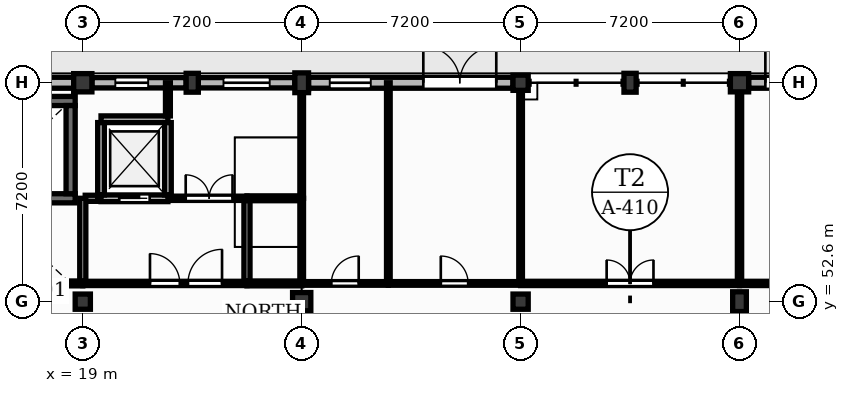
"""IFC4 building model, lengths in metres.
Left out: names, types, materials, properties, quantities, classifications, styles, units other than length and angle.
Written with IfcOpenShell. Run it as: python <this file> out.ifc"""

import sys

from ifc_helpers import new_model, si_unit, direction, frame, frame_2d, origin, origin_2d, place, context, subcontext, project, spatial, rectangle, extrude, element, fill, save


model = new_model("IFC4")
c1 = context("Model", 3, precision=1e-05, world=origin(), true_north=direction((0.0, 1.0)))
c2 = subcontext(c1, "Body", "Model", "MODEL_VIEW")
j1 = project(units=[si_unit("LENGTHUNIT", "METRE"), si_unit("PLANEANGLEUNIT", "RADIAN")], contexts=[c1])
p1 = place(None, origin())
s1 = spatial("IfcSite", under=j1, at=p1, CompositionType="ELEMENT")
p2 = place(p1, origin())
s2 = spatial("IfcBuilding", under=s1, at=p2, CompositionType="ELEMENT")
p3 = place(p2, origin())
s3 = spatial("IfcBuildingStorey", under=s2, at=p3, CompositionType="ELEMENT", Elevation=0.0)
p4 = place(p3, frame((19.0, 52.6, 0.0), z_axis=(0.0, 0.0, 1.0), x_axis=(1.0, 0.0, 0.0)))
e1 = element("IfcColumn", 1, at=p4, inside=s3, PredefinedType="COLUMN", context=c2, shape_type="SweptSolid", body=[
    extrude(rectangle(XDim=0.5, YDim=0.5, at=origin_2d()), origin(), (0.0, 0.0, 1.0), 4.2),
])
for number, where, z_axis, x_axis in (
    (2, (19.0, 59.8, 0.0), (0.0, 0.0, 1.0), (1.0, 0.0, 0.0)),
    (3, (26.2, 52.6, 0.0), (0.0, 0.0, 1.0), (1.0, 0.0, 0.0)),
):
    element("IfcColumn", number, at=place(p3, frame(where, z_axis=z_axis, x_axis=x_axis)), inside=s3, PredefinedType="COLUMN", context=c2, shape_type="SweptSolid", body=[
        extrude(rectangle(XDim=0.6, YDim=0.6, at=origin_2d()), origin(), (0.0, 0.0, 1.0), 4.2),
    ])
p5 = place(p3, frame((26.2, 59.8, 0.0), z_axis=(0.0, 0.0, 1.0), x_axis=(1.0, 0.0, 0.0)))
e4 = element("IfcColumn", 4, at=p5, inside=s3, PredefinedType="COLUMN", context=c2, shape_type="SweptSolid", body=[
    extrude(rectangle(XDim=0.45, YDim=0.65, at=origin_2d()), origin(), (0.0, 0.0, 1.0), 4.2),
])
for number, where, z_axis, x_axis in (
    (5, (33.4, 52.6, 0.0), (0.0, 0.0, 1.0), (1.0, 0.0, 0.0)),
    (6, (33.4, 59.8, 0.0), (0.0, 0.0, 1.0), (1.0, 0.0, 0.0)),
):
    element("IfcColumn", number, at=place(p3, frame(where, z_axis=z_axis, x_axis=x_axis)), inside=s3, PredefinedType="COLUMN", context=c2, shape_type="SweptSolid", body=[
        extrude(rectangle(XDim=0.5, YDim=0.5, at=origin_2d()), origin(), (0.0, 0.0, 1.0), 4.2),
    ])
p6 = place(p3, frame((40.6, 52.6, 0.0), z_axis=(0.0, 0.0, 1.0), x_axis=(1.0, 0.0, 0.0)))
e7 = element("IfcColumn", 7, at=p6, inside=s3, PredefinedType="COLUMN", context=c2, shape_type="SweptSolid", body=[
    extrude(rectangle(XDim=0.45, YDim=0.65, at=origin_2d()), origin(), (0.0, 0.0, 1.0), 4.2),
])
p7 = place(p3, frame((40.6, 59.8, 0.0), z_axis=(0.0, 0.0, 1.0), x_axis=(1.0, 0.0, 0.0)))
e8 = element("IfcColumn", 8, at=p7, inside=s3, PredefinedType="COLUMN", context=c2, shape_type="SweptSolid", body=[
    extrude(rectangle(XDim=0.6, YDim=0.6, at=origin_2d()), origin(), (0.0, 0.0, 1.0), 4.2),
])
for number, where, z_axis, x_axis in (
    (9, (22.6, 59.8, 0.0), (0.0, 0.0, 1.0), (1.0, 0.0, 0.0)),
    (10, (37.0, 59.8, 0.0), (0.0, 0.0, 1.0), (1.0, 0.0, 0.0)),
):
    element("IfcColumn", number, at=place(p3, frame(where, z_axis=z_axis, x_axis=x_axis)), inside=s3, PredefinedType="PILASTER", context=c2, shape_type="SweptSolid", body=[
        extrude(rectangle(XDim=0.4, YDim=0.62, at=origin_2d()), origin(), (0.0, 0.0, 1.0), 4.2),
    ])
p8 = place(p3, frame((12.025, 59.8, 0.0), z_axis=(0.0, 0.0, 1.0), x_axis=(1.0, 0.0, 0.0)))
e11 = element("IfcWall", 11, at=p8, inside=s3, PredefinedType="SOLIDWALL", context=c2, shape_type="SweptSolid", body=[
    extrude(rectangle(XDim=6.675, YDim=0.36, at=frame_2d((3.337, 0.0))), origin(), (0.0, 0.0, 1.0), 3.68),
])
p9 = place(p3, frame((19.3, 59.8, 0.0), z_axis=(0.0, 0.0, 1.0), x_axis=(1.0, 0.0, 0.0)))
e12 = element("IfcWall", 12, at=p9, inside=s3, PredefinedType="SOLIDWALL", context=c2, shape_type="SweptSolid", body=[
    extrude(rectangle(XDim=3.1, YDim=0.34, at=frame_2d((1.55, 0.0))), origin(), (0.0, 0.0, 1.0), 3.68),
])
p10 = place(p9, frame((0.77, 0.0, 1.0)))
e13 = element("IfcOpeningElement", 13, at=p10, cuts=e12, PredefinedType="OPENING", context=c2, shape_type="SweptSolid", body=[
    extrude(rectangle(XDim=1.08, YDim=1.95, at=frame_2d((0.54, 0.975))), frame((0.0, 0.18, 0.0), z_axis=(0.0, -1.0, 0.0), x_axis=(1.0, 0.0, 0.0)), (0.0, 0.0, 1.0), 0.36),
])
p11 = place(p3, frame((22.8, 59.8, 0.0), z_axis=(0.0, 0.0, 1.0), x_axis=(1.0, 0.0, 0.0)))
e14 = element("IfcWall", 14, at=p11, inside=s3, PredefinedType="SOLIDWALL", context=c2, shape_type="SweptSolid", body=[
    extrude(rectangle(XDim=3.175, YDim=0.34, at=frame_2d((1.587, 0.0))), origin(), (0.0, 0.0, 1.0), 3.68),
])
p12 = place(p11, frame((0.827, 0.0, 1.0)))
e15 = element("IfcOpeningElement", 15, at=p12, cuts=e14, PredefinedType="OPENING", context=c2, shape_type="SweptSolid", body=[
    extrude(rectangle(XDim=1.52, YDim=1.8, at=frame_2d((0.76, 0.9))), frame((0.0, 0.18, 0.0), z_axis=(0.0, -1.0, 0.0), x_axis=(1.0, 0.0, 0.0)), (0.0, 0.0, 1.0), 0.36),
])
p13 = place(p3, frame((26.425, 59.8, 0.0), z_axis=(0.0, 0.0, 1.0), x_axis=(1.0, 0.0, 0.0)))
e16 = element("IfcWall", 16, at=p13, inside=s3, PredefinedType="SOLIDWALL", context=c2, shape_type="SweptSolid", body=[
    extrude(rectangle(XDim=6.725, YDim=0.36, at=frame_2d((3.362, 0.0))), origin(), (0.0, 0.0, 1.0), 3.68),
])
p14 = place(p13, frame((3.775, 0.0, 0.0)))
e17 = element("IfcOpeningElement", 17, at=p14, cuts=e16, PredefinedType="OPENING", context=c2, shape_type="SweptSolid", body=[
    extrude(rectangle(XDim=2.4, YDim=2.8, at=frame_2d((1.2, 1.4))), frame((0.0, 0.19, 0.0), z_axis=(0.0, -1.0, 0.0), x_axis=(1.0, 0.0, 0.0)), (0.0, 0.0, 1.0), 0.38),
])
p15 = place(p13, frame((0.698, 0.0, 1.0)))
e18 = element("IfcOpeningElement", 18, at=p15, cuts=e16, PredefinedType="OPENING", context=c2, shape_type="SweptSolid", body=[
    extrude(rectangle(XDim=1.35, YDim=2.2, at=frame_2d((0.675, 1.1))), frame((0.0, 0.19, 0.0), z_axis=(0.0, -1.0, 0.0), x_axis=(1.0, 0.0, 0.0)), (0.0, 0.0, 1.0), 0.38),
])
p16 = place(p3, frame((40.9, 59.8, 0.0), z_axis=(0.0, 0.0, 1.0), x_axis=(1.0, 0.0, 0.0)))
e19 = element("IfcWall", 19, at=p16, inside=s3, PredefinedType="SOLIDWALL", context=c2, shape_type="SweptSolid", body=[
    extrude(rectangle(XDim=6.65, YDim=0.36, at=frame_2d((3.325, 0.0))), origin(), (0.0, 0.0, 1.0), 3.68),
])
p17 = place(p16, frame((0.55, 0.0, 0.0)))
e20 = element("IfcOpeningElement", 20, at=p17, cuts=e19, PredefinedType="OPENING", context=c2, shape_type="SweptSolid", body=[
    extrude(rectangle(XDim=1.22, YDim=2.2, at=frame_2d((0.61, 1.1))), frame((0.0, 0.19, 0.0), z_axis=(0.0, -1.0, 0.0), x_axis=(1.0, 0.0, 0.0)), (0.0, 0.0, 1.0), 0.38),
])
p18 = place(p16, frame((4.49, 0.0, 0.0)))
e21 = element("IfcOpeningElement", 21, at=p18, cuts=e19, PredefinedType="OPENING", context=c2, shape_type="SweptSolid", body=[
    extrude(rectangle(XDim=1.22, YDim=2.2, at=frame_2d((0.61, 1.1))), frame((0.0, 0.19, 0.0), z_axis=(0.0, -1.0, 0.0), x_axis=(1.0, 0.0, 0.0)), (0.0, 0.0, 1.0), 0.38),
])
for number, where, z_axis, x_axis in (
    (22, (12.05, 56.0, 0.0), (0.0, 0.0, 1.0), (1.0, 0.0, 0.0)),
    (23, (12.05, 59.2, 0.0), (0.0, 0.0, 1.0), (1.0, 0.0, 0.0)),
):
    element("IfcWall", number, at=place(p3, frame(where, z_axis=z_axis, x_axis=x_axis)), inside=s3, PredefinedType="SHEAR", context=c2, shape_type="SweptSolid", body=[
        extrude(rectangle(XDim=6.7, YDim=0.3, at=frame_2d((3.35, 0.0))), origin(), (0.0, 0.0, 1.0), 4.25),
    ])
p19 = place(p3, frame((18.6, 56.15, 0.0), z_axis=(0.0, 0.0, 1.0), x_axis=(0.0, 1.0, 0.0)))
e24 = element("IfcWall", 24, at=p19, inside=s3, PredefinedType="SHEAR", context=c2, shape_type="SweptSolid", body=[
    extrude(rectangle(XDim=2.9, YDim=0.3, at=frame_2d((1.45, 0.0))), origin(), (0.0, 0.0, 1.0), 4.25),
])
p20 = place(p3, frame((19.6, 56.0, 0.0), z_axis=(0.0, 0.0, 1.0), x_axis=(1.0, 0.0, 0.0)))
e25 = element("IfcWall", 25, at=p20, inside=s3, PredefinedType="SOLIDWALL", context=c2, shape_type="SweptSolid", body=[
    extrude(rectangle(XDim=2.2, YDim=0.22, at=frame_2d((1.1, 0.0))), origin(), (0.0, 0.0, 1.0), 4.25),
])
p21 = place(p20, frame((0.6, 0.0, 0.0)))
e26 = element("IfcOpeningElement", 26, at=p21, cuts=e25, PredefinedType="OPENING", context=c2, shape_type="SweptSolid", body=[
    extrude(rectangle(XDim=1.0, YDim=2.15, at=frame_2d((0.5, 1.075))), frame((0.0, 0.12, 0.0), z_axis=(0.0, -1.0, 0.0), x_axis=(1.0, 0.0, 0.0)), (0.0, 0.0, 1.0), 0.24),
])
p22 = place(p3, frame((19.6, 58.6, 0.0), z_axis=(0.0, 0.0, 1.0), x_axis=(1.0, 0.0, 0.0)))
e27 = element("IfcWall", 27, at=p22, inside=s3, PredefinedType="SOLIDWALL", context=c2, shape_type="SweptSolid", body=[
    extrude(rectangle(XDim=2.2, YDim=0.22, at=frame_2d((1.1, 0.0))), origin(), (0.0, 0.0, 1.0), 4.25),
])
for number, where, z_axis, x_axis in (
    (28, (19.6, 56.11, 0.0), (0.0, 0.0, 1.0), (0.0, 1.0, 0.0)),
    (29, (21.8, 56.11, 0.0), (0.0, 0.0, 1.0), (0.0, 1.0, 0.0)),
):
    element("IfcWall", number, at=place(p3, frame(where, z_axis=z_axis, x_axis=x_axis)), inside=s3, PredefinedType="SOLIDWALL", context=c2, shape_type="SweptSolid", body=[
        extrude(rectangle(XDim=2.38, YDim=0.22, at=frame_2d((1.19, 0.0))), origin(), (0.0, 0.0, 1.0), 4.25),
    ])
p23 = place(p3, frame((19.0, 53.2, 0.0), z_axis=(0.0, 0.0, 1.0), x_axis=(1.0, 0.0, 0.0)))
e30 = element("IfcWall", 30, at=p23, inside=s3, PredefinedType="PARTITIONING", context=c2, shape_type="SweptSolid", body=[
    extrude(rectangle(XDim=5.4, YDim=0.14, at=frame_2d((2.7, 0.0))), origin(), (0.0, 0.0, 1.0), 4.18),
])
p24 = place(p23, frame((2.21, 0.0, 0.0)))
e31 = element("IfcOpeningElement", 31, at=p24, cuts=e30, PredefinedType="OPENING", context=c2, shape_type="SweptSolid", body=[
    extrude(rectangle(XDim=0.98, YDim=2.15, at=frame_2d((0.49, 1.075))), frame((0.0, 0.08, 0.0), z_axis=(0.0, -1.0, 0.0), x_axis=(1.0, 0.0, 0.0)), (0.0, 0.0, 1.0), 0.16),
])
p25 = place(p23, frame((3.46, 0.0, 0.0)))
e32 = element("IfcOpeningElement", 32, at=p25, cuts=e30, PredefinedType="OPENING", context=c2, shape_type="SweptSolid", body=[
    extrude(rectangle(XDim=1.12, YDim=2.15, at=frame_2d((0.56, 1.075))), frame((0.0, 0.08, 0.0), z_axis=(0.0, -1.0, 0.0), x_axis=(1.0, 0.0, 0.0)), (0.0, 0.0, 1.0), 0.16),
])
p26 = place(p3, frame((21.91, 56.0, 0.0), z_axis=(0.0, 0.0, 1.0), x_axis=(1.0, 0.0, 0.0)))
e33 = element("IfcWall", 33, at=p26, inside=s3, PredefinedType="PARTITIONING", context=c2, shape_type="SweptSolid", body=[
    extrude(rectangle(XDim=2.49, YDim=0.14, at=frame_2d((1.245, 0.0))), origin(), (0.0, 0.0, 1.0), 4.18),
])
p27 = place(p26, frame((0.475, 0.0, 0.0)))
e34 = element("IfcOpeningElement", 34, at=p27, cuts=e33, PredefinedType="OPENING", context=c2, shape_type="SweptSolid", body=[
    extrude(rectangle(XDim=1.54, YDim=2.25, at=frame_2d((0.77, 1.125))), frame((0.0, 0.08, 0.0), z_axis=(0.0, -1.0, 0.0), x_axis=(1.0, 0.0, 0.0)), (0.0, 0.0, 1.0), 0.16),
])
p28 = place(p3, frame((26.2, 53.2, 0.0), z_axis=(0.0, 0.0, 1.0), x_axis=(1.0, 0.0, 0.0)))
e35 = element("IfcWall", 35, at=p28, inside=s3, PredefinedType="PLUMBINGWALL", context=c2, shape_type="SweptSolid", body=[
    extrude(rectangle(XDim=2.85, YDim=0.12, at=frame_2d((1.425, 0.0))), origin(), (0.0, 0.0, 1.0), 4.18),
])
p29 = place(p28, frame((0.975, 0.0, 0.0)))
e36 = element("IfcOpeningElement", 36, at=p29, cuts=e35, PredefinedType="OPENING", context=c2, shape_type="SweptSolid", body=[
    extrude(rectangle(XDim=0.9, YDim=2.1, at=frame_2d((0.45, 1.05))), frame((0.0, 0.07, 0.0), z_axis=(0.0, -1.0, 0.0), x_axis=(1.0, 0.0, 0.0)), (0.0, 0.0, 1.0), 0.14),
])
p30 = place(p3, frame((26.2, 56.0, 0.0), z_axis=(0.0, 0.0, 1.0), x_axis=(0.0, 1.0, 0.0)))
e37 = element("IfcWall", 37, at=p30, inside=s3, PredefinedType="PLUMBINGWALL", context=c2, shape_type="SweptSolid", body=[
    extrude(rectangle(XDim=3.475, YDim=0.12, at=frame_2d((1.738, 0.0))), origin(), (0.0, 0.0, 1.0), 3.5),
])
p31 = place(p3, frame((29.05, 53.27, 0.0), z_axis=(0.0, 0.0, 1.0), x_axis=(0.0, 1.0, 0.0)))
e38 = element("IfcWall", 38, at=p31, inside=s3, PredefinedType="PLUMBINGWALL", context=c2, shape_type="SweptSolid", body=[
    extrude(rectangle(XDim=6.53, YDim=0.12, at=frame_2d((3.265, 0.0))), origin(), (0.0, 0.0, 1.0), 4.18),
])
p32 = place(p3, frame((29.05, 53.2, 0.0), z_axis=(0.0, 0.0, 1.0), x_axis=(1.0, 0.0, 0.0)))
e39 = element("IfcWall", 39, at=p32, inside=s3, PredefinedType="PLUMBINGWALL", context=c2, shape_type="SweptSolid", body=[
    extrude(rectangle(XDim=4.35, YDim=0.12, at=frame_2d((2.175, 0.0))), origin(), (0.0, 0.0, 1.0), 4.18),
])
p33 = place(p32, frame((1.725, 0.0, 0.0)))
e40 = element("IfcOpeningElement", 40, at=p33, cuts=e39, PredefinedType="OPENING", context=c2, shape_type="SweptSolid", body=[
    extrude(rectangle(XDim=0.9, YDim=2.1, at=frame_2d((0.45, 1.05))), frame((0.0, 0.07, 0.0), z_axis=(0.0, -1.0, 0.0), x_axis=(1.0, 0.0, 0.0)), (0.0, 0.0, 1.0), 0.14),
])
p34 = place(p3, frame((33.4, 53.27, 0.0), z_axis=(0.0, 0.0, 1.0), x_axis=(0.0, 1.0, 0.0)))
e41 = element("IfcWall", 41, at=p34, inside=s3, PredefinedType="PLUMBINGWALL", context=c2, shape_type="SweptSolid", body=[
    extrude(rectangle(XDim=6.28, YDim=0.12, at=frame_2d((3.14, 0.0))), origin(), (0.0, 0.0, 1.0), 3.5),
])
p35 = place(p3, frame((33.4, 53.2, 0.0), z_axis=(0.0, 0.0, 1.0), x_axis=(1.0, 0.0, 0.0)))
e42 = element("IfcWall", 42, at=p35, inside=s3, PredefinedType="PARTITIONING", context=c2, shape_type="SweptSolid", body=[
    extrude(rectangle(XDim=7.2, YDim=0.14, at=frame_2d((3.6, 0.0))), origin(), (0.0, 0.0, 1.0), 4.18),
])
p36 = place(p35, frame((2.83, 0.0, 0.0)))
e43 = element("IfcOpeningElement", 43, at=p36, cuts=e42, PredefinedType="OPENING", context=c2, shape_type="SweptSolid", body=[
    extrude(rectangle(XDim=1.54, YDim=2.25, at=frame_2d((0.77, 1.125))), frame((0.0, 0.08, 0.0), z_axis=(0.0, -1.0, 0.0), x_axis=(1.0, 0.0, 0.0)), (0.0, 0.0, 1.0), 0.16),
])
p37 = place(p3, frame((40.6, 53.27, 0.0), z_axis=(0.0, 0.0, 1.0), x_axis=(0.0, 1.0, 0.0)))
e44 = element("IfcWall", 44, at=p37, inside=s3, PredefinedType="PARTITIONING", context=c2, shape_type="SweptSolid", body=[
    extrude(rectangle(XDim=6.23, YDim=0.14, at=frame_2d((3.115, 0.0))), origin(), (0.0, 0.0, 1.0), 3.5),
])
p38 = place(p3, frame((40.6, 53.2, 0.0), z_axis=(0.0, 0.0, 1.0), x_axis=(1.0, 0.0, 0.0)))
e45 = element("IfcWall", 45, at=p38, inside=s3, PredefinedType="PARTITIONING", context=c2, shape_type="SweptSolid", body=[
    extrude(rectangle(XDim=3.2, YDim=0.14, at=frame_2d((1.6, 0.0))), origin(), (0.0, 0.0, 1.0), 4.18),
])
p39 = place(p38, frame((1.125, 0.0, 0.0)))
e46 = element("IfcOpeningElement", 46, at=p39, cuts=e45, PredefinedType="OPENING", context=c2, shape_type="SweptSolid", body=[
    extrude(rectangle(XDim=0.95, YDim=2.1, at=frame_2d((0.475, 1.05))), frame((0.0, 0.08, 0.0), z_axis=(0.0, -1.0, 0.0), x_axis=(1.0, 0.0, 0.0)), (0.0, 0.0, 1.0), 0.16),
])
p40 = place(p3, frame((24.4, 53.27, 0.0), z_axis=(0.0, 0.0, 1.0), x_axis=(0.0, 1.0, 0.0)))
e47 = element("IfcWall", 47, at=p40, inside=s3, PredefinedType="PARTITIONING", context=c2, shape_type="SweptSolid", body=[
    extrude(rectangle(XDim=2.66, YDim=0.2, at=frame_2d((1.33, 0.0))), origin(), (0.0, 0.0, 1.0), 4.18),
])
p41 = place(p3, frame((19.49, 56.0, 0.0), z_axis=(0.0, 0.0, 1.0), x_axis=(-1.0, 0.0, 0.0)))
e48 = element("IfcWall", 48, at=p41, inside=s3, PredefinedType="PARTITIONING", context=c2, shape_type="SweptSolid", body=[
    extrude(rectangle(XDim=0.41, YDim=0.2, at=frame_2d((0.205, 0.0))), origin(), (0.0, 0.0, 1.0), 4.18),
])
p42 = place(p3, frame((19.0, 53.27, 0.0), z_axis=(0.0, 0.0, 1.0), x_axis=(0.0, 1.0, 0.0)))
e49 = element("IfcWall", 49, at=p42, inside=s3, PredefinedType="PARTITIONING", context=c2, shape_type="SweptSolid", body=[
    extrude(rectangle(XDim=2.73, YDim=0.2, at=frame_2d((1.365, 0.0))), origin(), (0.0, 0.0, 1.0), 3.5),
])
p43 = place(p3, frame((26.2, 53.2, 0.0), z_axis=(0.0, 0.0, 1.0), x_axis=(-1.0, 0.0, 0.0)))
e50 = element("IfcWall", 50, at=p43, inside=s3, PredefinedType="PARTITIONING", context=c2, shape_type="SweptSolid", body=[
    extrude(rectangle(XDim=1.8, YDim=0.16, at=frame_2d((0.9, 0.0))), origin(), (0.0, 0.0, 1.0), 4.18),
])
p44 = place(p3, frame((19.0, 53.2, 0.0), z_axis=(0.0, 0.0, 1.0), x_axis=(-1.0, 0.0, 0.0)))
e51 = element("IfcWall", 51, at=p44, inside=s3, PredefinedType="PARTITIONING", context=c2, shape_type="SweptSolid", body=[
    extrude(rectangle(XDim=2.8, YDim=0.16, at=frame_2d((1.4, 0.0))), origin(), (0.0, 0.0, 1.0), 4.18),
])
p45 = place(p3, frame((26.2, 53.27, 0.0), z_axis=(0.0, 0.0, 1.0), x_axis=(0.0, 1.0, 0.0)))
e52 = element("IfcWall", 52, at=p45, inside=s3, PredefinedType="PLUMBINGWALL", context=c2, shape_type="SweptSolid", body=[
    extrude(rectangle(XDim=2.73, YDim=0.12, at=frame_2d((1.365, 0.0))), origin(), (0.0, 0.0, 1.0), 3.5),
])
p46 = place(p3, frame((24.4, 56.0, 0.0), z_axis=(0.0, 0.0, 1.0), x_axis=(1.0, 0.0, 0.0)))
e53 = element("IfcWall", 53, at=p46, inside=s3, PredefinedType="PARTITIONING", context=c2, shape_type="SweptSolid", body=[
    extrude(rectangle(XDim=1.8, YDim=0.16, at=frame_2d((0.9, 0.0))), origin(), (0.0, 0.0, 1.0), 4.18),
])
p47 = place(p3, frame((21.8, 58.71, 0.0), z_axis=(0.0, 0.0, 1.0), x_axis=(0.0, 1.0, 0.0)))
e54 = element("IfcWall", 54, at=p47, inside=s3, PredefinedType="PARTITIONING", context=c2, shape_type="SweptSolid", body=[
    extrude(rectangle(XDim=1.09, YDim=0.16, at=frame_2d((0.545, 0.0))), origin(), (0.0, 0.0, 1.0), 4.18),
])
p48 = place(p10, origin())
e55 = element("IfcWindow", 55, at=p48, inside=s3, PartitioningType="SINGLE_PANEL", PredefinedType="WINDOW", context=c2, shape_type="SweptSolid", body=[
    extrude(rectangle(XDim=1.08, YDim=1.95, at=frame_2d((0.54, 0.975))), frame((0.0, 0.03, 0.0), z_axis=(0.0, -1.0, 0.0), x_axis=(1.0, 0.0, 0.0)), (0.0, 0.0, 1.0), 0.06),
])
fill(e13, e55)
p49 = place(p12, origin())
e56 = element("IfcWindow", 56, at=p49, inside=s3, PartitioningType="DOUBLE_PANEL_VERTICAL", PredefinedType="WINDOW", context=c2, shape_type="SweptSolid", body=[
    extrude(rectangle(XDim=1.52, YDim=1.8, at=frame_2d((0.76, 0.9))), frame((0.0, 0.03, 0.0), z_axis=(0.0, -1.0, 0.0), x_axis=(1.0, 0.0, 0.0)), (0.0, 0.0, 1.0), 0.06),
])
fill(e15, e56)
p50 = place(p14, origin())
e57 = element("IfcDoor", 57, at=p50, inside=s3, OperationType="DOUBLE_DOOR_SINGLE_SWING", PredefinedType="DOOR", context=c2, shape_type="SweptSolid", body=[
    extrude(rectangle(XDim=2.4, YDim=2.8, at=frame_2d((1.2, 1.4))), frame((0.0, 0.025, 0.0), z_axis=(0.0, -1.0, 0.0), x_axis=(1.0, 0.0, 0.0)), (0.0, 0.0, 1.0), 0.05),
])
fill(e17, e57)
p51 = place(p15, origin())
e58 = element("IfcWindow", 58, at=p51, inside=s3, PartitioningType="SINGLE_PANEL", PredefinedType="WINDOW", context=c2, shape_type="SweptSolid", body=[
    extrude(rectangle(XDim=1.35, YDim=2.2, at=frame_2d((0.675, 1.1))), frame((0.0, 0.03, 0.0), z_axis=(0.0, -1.0, 0.0), x_axis=(1.0, 0.0, 0.0)), (0.0, 0.0, 1.0), 0.06),
])
fill(e18, e58)
p52 = place(p17, origin())
e59 = element("IfcDoor", 59, at=p52, inside=s3, OperationType="SINGLE_SWING_LEFT", PredefinedType="DOOR", context=c2, shape_type="SweptSolid", body=[
    extrude(rectangle(XDim=1.22, YDim=2.2, at=frame_2d((0.61, 1.1))), frame((0.0, 0.025, 0.0), z_axis=(0.0, -1.0, 0.0), x_axis=(1.0, 0.0, 0.0)), (0.0, 0.0, 1.0), 0.05),
])
fill(e20, e59)
p53 = place(p21, origin())
e60 = element("IfcDoor", 60, at=p53, inside=s3, OperationType="SLIDING_TO_LEFT", PredefinedType="DOOR", context=c2, shape_type="SweptSolid", body=[
    extrude(rectangle(XDim=1.0, YDim=2.15, at=frame_2d((0.5, 1.075))), frame((0.0, 0.025, 0.0), z_axis=(0.0, -1.0, 0.0), x_axis=(1.0, 0.0, 0.0)), (0.0, 0.0, 1.0), 0.05),
])
fill(e26, e60)
p54 = place(p24, origin())
e61 = element("IfcDoor", 61, at=p54, inside=s3, OperationType="SINGLE_SWING_LEFT", PredefinedType="DOOR", context=c2, shape_type="SweptSolid", body=[
    extrude(rectangle(XDim=0.98, YDim=2.15, at=frame_2d((0.49, 1.075))), frame((0.0, 0.025, 0.0), z_axis=(0.0, -1.0, 0.0), x_axis=(1.0, 0.0, 0.0)), (0.0, 0.0, 1.0), 0.05),
])
fill(e31, e61)
p55 = place(p25, origin())
e62 = element("IfcDoor", 62, at=p55, inside=s3, OperationType="SINGLE_SWING_RIGHT", PredefinedType="DOOR", context=c2, shape_type="SweptSolid", body=[
    extrude(rectangle(XDim=1.12, YDim=2.15, at=frame_2d((0.56, 1.075))), frame((0.0, 0.025, 0.0), z_axis=(0.0, -1.0, 0.0), x_axis=(1.0, 0.0, 0.0)), (0.0, 0.0, 1.0), 0.05),
])
fill(e32, e62)
p56 = place(p29, origin())
e63 = element("IfcDoor", 63, at=p56, inside=s3, OperationType="SINGLE_SWING_RIGHT", PredefinedType="DOOR", context=c2, shape_type="SweptSolid", body=[
    extrude(rectangle(XDim=0.9, YDim=2.1, at=frame_2d((0.45, 1.05))), frame((0.0, 0.025, 0.0), z_axis=(0.0, -1.0, 0.0), x_axis=(1.0, 0.0, 0.0)), (0.0, 0.0, 1.0), 0.05),
])
fill(e36, e63)
p57 = place(p33, origin())
e64 = element("IfcDoor", 64, at=p57, inside=s3, OperationType="SINGLE_SWING_LEFT", PredefinedType="DOOR", context=c2, shape_type="SweptSolid", body=[
    extrude(rectangle(XDim=0.9, YDim=2.1, at=frame_2d((0.45, 1.05))), frame((0.0, 0.025, 0.0), z_axis=(0.0, -1.0, 0.0), x_axis=(1.0, 0.0, 0.0)), (0.0, 0.0, 1.0), 0.05),
])
fill(e40, e64)
p58 = place(p27, origin())
e65 = element("IfcDoor", 65, at=p58, inside=s3, OperationType="DOUBLE_DOOR_SINGLE_SWING", PredefinedType="DOOR", context=c2, shape_type="SweptSolid", body=[
    extrude(rectangle(XDim=1.54, YDim=2.25, at=frame_2d((0.77, 1.125))), frame((0.0, 0.025, 0.0), z_axis=(0.0, -1.0, 0.0), x_axis=(1.0, 0.0, 0.0)), (0.0, 0.0, 1.0), 0.05),
])
fill(e34, e65)
p59 = place(p36, origin())
e66 = element("IfcDoor", 66, at=p59, inside=s3, OperationType="DOUBLE_DOOR_SINGLE_SWING", PredefinedType="DOOR", context=c2, shape_type="SweptSolid", body=[
    extrude(rectangle(XDim=1.54, YDim=2.25, at=frame_2d((0.77, 1.125))), frame((0.0, 0.025, 0.0), z_axis=(0.0, -1.0, 0.0), x_axis=(1.0, 0.0, 0.0)), (0.0, 0.0, 1.0), 0.05),
])
fill(e43, e66)
save(model, sys.argv[1])
